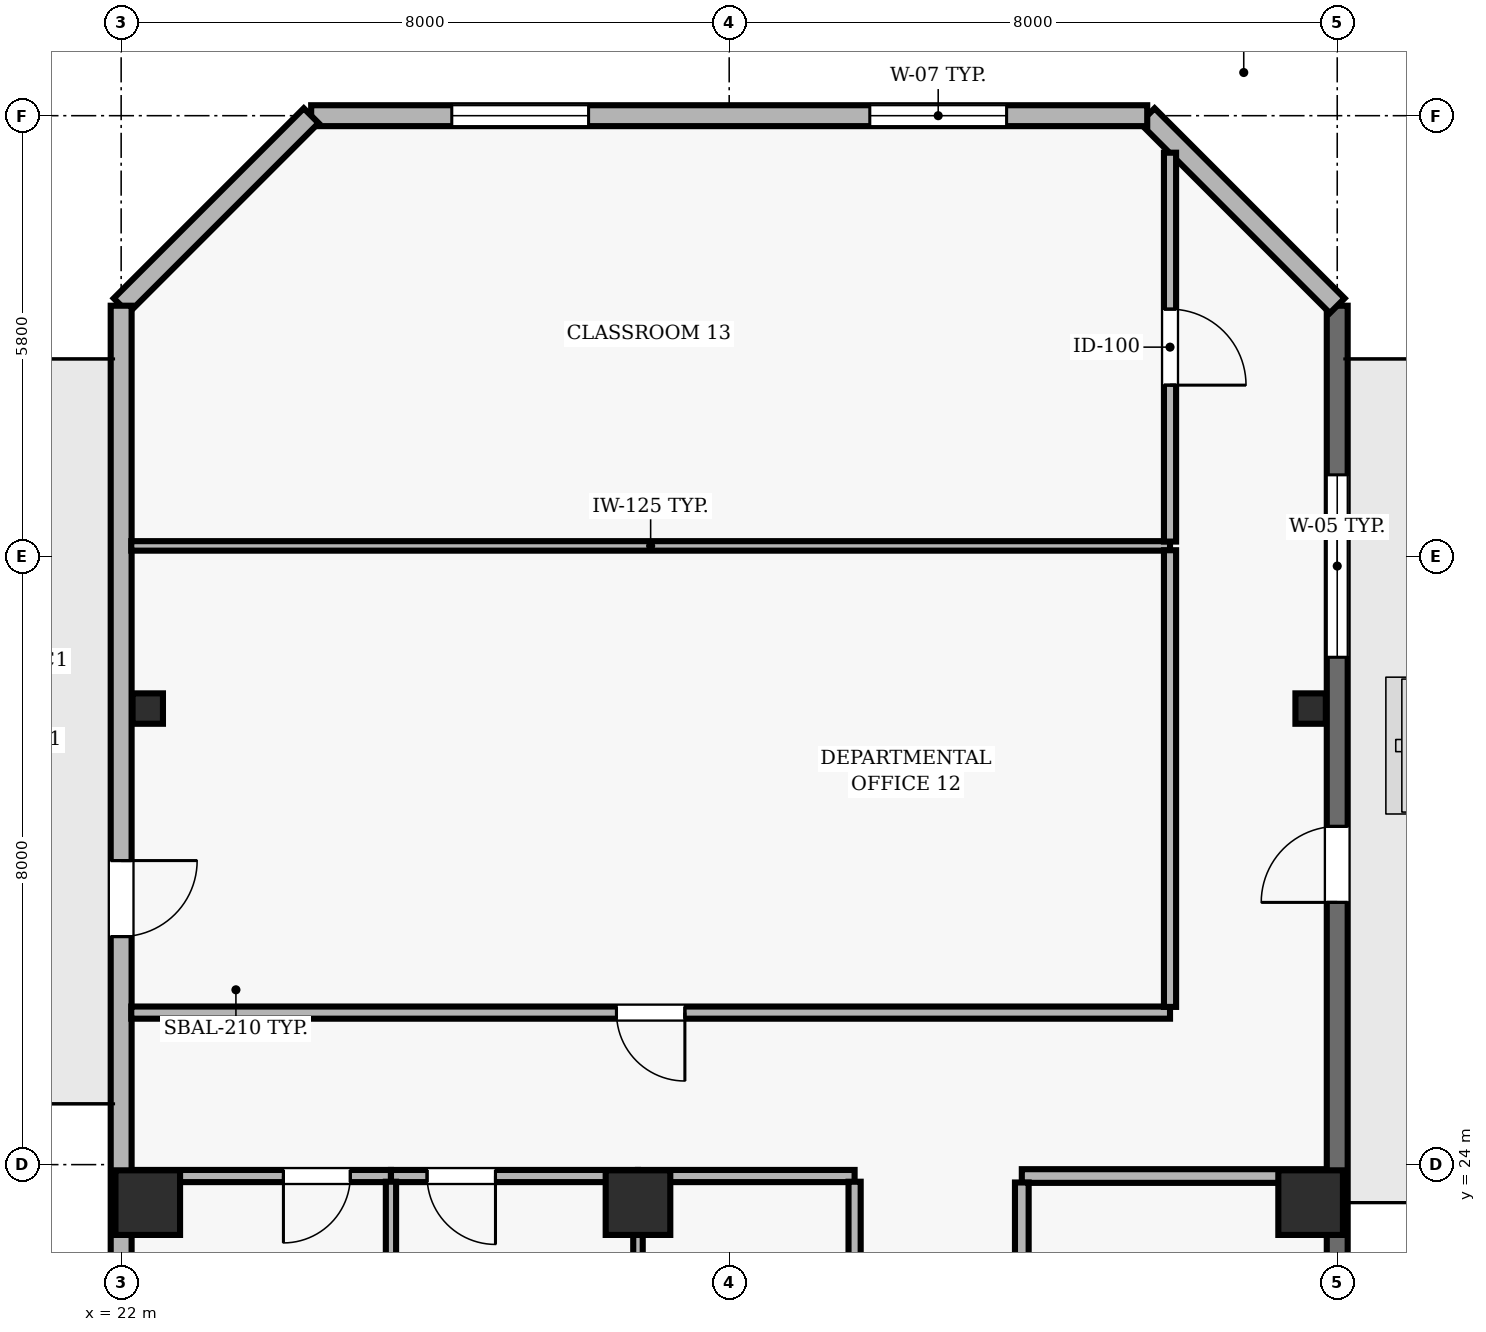
"""IFC4 building model, lengths in metres.
Left out: names, types, materials, properties, quantities, classifications, styles, units other than length and angle.
Written with IfcOpenShell. Run it as: python <this file> out.ifc"""

import sys

from ifc_helpers import new_model, si_unit, direction, frame, frame_2d, origin, origin_2d, place, context, subcontext, project, spatial, rectangle, hollow_rectangle, extrude, element, fill, save


model = new_model("IFC4")
c1 = context("Model", 3, precision=1e-05, world=origin(), true_north=direction((0.0, 1.0)))
c2 = subcontext(c1, "Body", "Model", "MODEL_VIEW")
j1 = project(units=[si_unit("LENGTHUNIT", "METRE"), si_unit("PLANEANGLEUNIT", "RADIAN")], contexts=[c1])
p1 = place(None, origin())
s1 = spatial("IfcSite", under=j1, at=p1, CompositionType="ELEMENT")
p2 = place(p1, origin())
s2 = spatial("IfcBuilding", under=s1, at=p2, CompositionType="ELEMENT")
p3 = place(p2, frame((0.0, 0.0, 279.4)))
s3 = spatial("IfcBuildingStorey", under=s2, at=p3, CompositionType="ELEMENT", Elevation=279.4)
for number, where, z_axis, x_axis in (
    (1, (22.35, 23.5, 0.0), (0.0, 0.0, 1.0), (1.0, 0.0, 0.0)),
    (2, (28.8, 23.5, 0.0), (0.0, 0.0, 1.0), (1.0, 0.0, 0.0)),
    (3, (37.65, 23.5, 0.0), (0.0, 0.0, 1.0), (1.0, 0.0, 0.0)),
):
    element("IfcColumn", number, at=place(p3, frame(where, z_axis=z_axis, x_axis=x_axis)), inside=s3, PredefinedType="COLUMN", context=c2, shape_type="SweptSolid", body=[
        extrude(rectangle(XDim=0.85, YDim=0.85, at=origin_2d()), origin(), (0.0, 0.0, 1.0), 3.9),
    ])
for number, where, z_axis, x_axis in (
    (4, (22.35, 30.0, 0.0), (0.0, 0.0, 1.0), (1.0, 0.0, 0.0)),
    (5, (37.65, 30.0, 0.0), (0.0, 0.0, 1.0), (1.0, 0.0, 0.0)),
):
    element("IfcColumn", number, at=place(p3, frame(where, z_axis=z_axis, x_axis=x_axis)), inside=s3, PredefinedType="COLUMN", context=c2, shape_type="SweptSolid", body=[
        extrude(hollow_rectangle(XDim=0.4, YDim=0.4, WallThickness=0.02, at=origin_2d()), origin(), (0.0, 0.0, 1.0), 3.9),
    ])
p4 = place(p3, frame((38.0, 21.6, 0.0), z_axis=(0.0, 0.0, 1.0), x_axis=(0.0, 1.0, 0.0)))
e6 = element("IfcWall", 6, at=p4, inside=s3, PredefinedType="SOLIDWALL", context=c2, shape_type="SweptSolid", body=[
    extrude(rectangle(XDim=13.7, YDim=0.275, at=frame_2d((6.85, 0.0))), origin(), (0.0, 0.0, 1.0), 3.69),
])
p5 = place(p4, frame((5.85, 0.0, 0.0)))
e7 = element("IfcOpeningElement", 7, at=p5, cuts=e6, PredefinedType="OPENING", context=c2, shape_type="SweptSolid", body=[
    extrude(rectangle(XDim=1.0, YDim=2.2, at=frame_2d((0.5, 1.1))), frame((0.0, 0.147, 0.0), z_axis=(0.0, -1.0, 0.0), x_axis=(1.0, 0.0, 0.0)), (0.0, 0.0, 1.0), 0.295),
])
p6 = place(p4, frame((9.075, 0.0, 0.9)))
e8 = element("IfcOpeningElement", 8, at=p6, cuts=e6, PredefinedType="OPENING", context=c2, shape_type="SweptSolid", body=[
    extrude(rectangle(XDim=2.4, YDim=1.6, at=frame_2d((1.2, 0.8))), frame((0.0, 0.147, 0.0), z_axis=(0.0, -1.0, 0.0), x_axis=(1.0, 0.0, 0.0)), (0.0, 0.0, 1.0), 0.295),
])
p7 = place(p3, frame((38.0, 35.3, 0.0), z_axis=(0.0, 0.0, 1.0), x_axis=(-0.707106781187, 0.707106781187, 0.0)))
e9 = element("IfcWall", 9, at=p7, inside=s3, PredefinedType="SOLIDWALL", context=c2, shape_type="SweptSolid", body=[
    extrude(rectangle(XDim=3.536, YDim=0.275, at=frame_2d((1.768, 0.0))), origin(), (0.0, 0.0, 1.0), 3.69),
])
p8 = place(p3, frame((35.5, 37.8, 0.0), z_axis=(0.0, 0.0, 1.0), x_axis=(-1.0, 0.0, 0.0)))
e10 = element("IfcWall", 10, at=p8, inside=s3, PredefinedType="SOLIDWALL", context=c2, shape_type="SweptSolid", body=[
    extrude(rectangle(XDim=11.0, YDim=0.275, at=frame_2d((5.5, 0.0))), origin(), (0.0, 0.0, 1.0), 3.69),
])
p9 = place(p8, frame((1.85, 0.0, 0.9)))
e11 = element("IfcOpeningElement", 11, at=p9, cuts=e10, PredefinedType="OPENING", context=c2, shape_type="SweptSolid", body=[
    extrude(rectangle(XDim=1.8, YDim=1.8, at=frame_2d((0.9, 0.9))), frame((0.0, 0.147, 0.0), z_axis=(0.0, -1.0, 0.0), x_axis=(1.0, 0.0, 0.0)), (0.0, 0.0, 1.0), 0.295),
])
p10 = place(p8, frame((7.35, 0.0, 0.9)))
e12 = element("IfcOpeningElement", 12, at=p10, cuts=e10, PredefinedType="OPENING", context=c2, shape_type="SweptSolid", body=[
    extrude(rectangle(XDim=1.8, YDim=1.8, at=frame_2d((0.9, 0.9))), frame((0.0, 0.147, 0.0), z_axis=(0.0, -1.0, 0.0), x_axis=(1.0, 0.0, 0.0)), (0.0, 0.0, 1.0), 0.295),
])
p11 = place(p3, frame((24.5, 37.8, 0.0), z_axis=(0.0, 0.0, 1.0), x_axis=(-0.707106781187, -0.707106781187, 0.0)))
e13 = element("IfcWall", 13, at=p11, inside=s3, PredefinedType="SOLIDWALL", context=c2, shape_type="SweptSolid", body=[
    extrude(rectangle(XDim=3.536, YDim=0.275, at=frame_2d((1.768, 0.0))), origin(), (0.0, 0.0, 1.0), 3.69),
])
p12 = place(p3, frame((22.0, 35.3, 0.0), z_axis=(0.0, 0.0, 1.0), x_axis=(0.0, -1.0, 0.0)))
e14 = element("IfcWall", 14, at=p12, inside=s3, PredefinedType="SOLIDWALL", context=c2, shape_type="SweptSolid", body=[
    extrude(rectangle(XDim=32.8, YDim=0.275, at=frame_2d((16.4, 0.0))), origin(), (0.0, 0.0, 1.0), 3.69),
])
p13 = place(p12, frame((7.3, 0.0, 0.0)))
e15 = element("IfcOpeningElement", 15, at=p13, cuts=e14, PredefinedType="OPENING", context=c2, shape_type="SweptSolid", body=[
    extrude(rectangle(XDim=1.0, YDim=2.2, at=frame_2d((0.5, 1.1))), frame((0.0, 0.147, 0.0), z_axis=(0.0, -1.0, 0.0), x_axis=(1.0, 0.0, 0.0)), (0.0, 0.0, 1.0), 0.295),
])
p14 = place(p12, frame((12.717, 0.0, 0.9)))
e16 = element("IfcOpeningElement", 16, at=p14, cuts=e14, PredefinedType="OPENING", context=c2, shape_type="SweptSolid", body=[
    extrude(rectangle(XDim=2.8, YDim=1.8, at=frame_2d((1.4, 0.9))), frame((0.0, 0.147, 0.0), z_axis=(0.0, -1.0, 0.0), x_axis=(1.0, 0.0, 0.0)), (0.0, 0.0, 1.0), 0.295),
])
p15 = place(p12, frame((23.2, 0.0, 0.9)))
e17 = element("IfcOpeningElement", 17, at=p15, cuts=e14, PredefinedType="OPENING", context=c2, shape_type="SweptSolid", body=[
    extrude(rectangle(XDim=2.8, YDim=1.8, at=frame_2d((1.4, 0.9))), frame((0.0, 0.147, 0.0), z_axis=(0.0, -1.0, 0.0), x_axis=(1.0, 0.0, 0.0)), (0.0, 0.0, 1.0), 0.295),
])
p16 = place(p3, frame((25.55, 23.85, 0.0), z_axis=(0.0, 0.0, 1.0), x_axis=(-1.0, 0.0, 0.0)))
e18 = element("IfcWall", 18, at=p16, inside=s3, PredefinedType="PARTITIONING", context=c2, shape_type="SweptSolid", body=[
    extrude(rectangle(XDim=3.35, YDim=0.16, at=frame_2d((1.675, 0.0))), origin(), (0.0, 0.0, 1.0), 3.221),
])
p17 = place(p16, frame((0.535, 0.0, 0.0)))
e19 = element("IfcOpeningElement", 19, at=p17, cuts=e18, PredefinedType="OPENING", context=c2, shape_type="SweptSolid", body=[
    extrude(rectangle(XDim=0.88, YDim=2.1, at=frame_2d((0.44, 1.05))), frame((0.0, 0.09, 0.0), z_axis=(0.0, -1.0, 0.0), x_axis=(1.0, 0.0, 0.0)), (0.0, 0.0, 1.0), 0.18),
])
p18 = place(p3, frame((28.8, 23.85, 0.0), z_axis=(0.0, 0.0, 1.0), x_axis=(-1.0, 0.0, 0.0)))
e20 = element("IfcWall", 20, at=p18, inside=s3, PredefinedType="PARTITIONING", context=c2, shape_type="SweptSolid", body=[
    extrude(rectangle(XDim=3.25, YDim=0.16, at=frame_2d((1.625, 0.0))), origin(), (0.0, 0.0, 1.0), 3.221),
])
p19 = place(p18, frame((1.875, 0.0, 0.0)))
e21 = element("IfcOpeningElement", 21, at=p19, cuts=e20, PredefinedType="OPENING", context=c2, shape_type="SweptSolid", body=[
    extrude(rectangle(XDim=0.9, YDim=2.1, at=frame_2d((0.45, 1.05))), frame((0.0, 0.09, 0.0), z_axis=(0.0, -1.0, 0.0), x_axis=(1.0, 0.0, 0.0)), (0.0, 0.0, 1.0), 0.18),
])
p20 = place(p3, frame((31.65, 23.85, 0.0), z_axis=(0.0, 0.0, 1.0), x_axis=(-1.0, 0.0, 0.0)))
e22 = element("IfcWall", 22, at=p20, inside=s3, PredefinedType="PARTITIONING", context=c2, shape_type="SweptSolid", body=[
    extrude(rectangle(XDim=2.85, YDim=0.16, at=frame_2d((1.425, 0.0))), origin(), (0.0, 0.0, 1.0), 3.221),
])
p21 = place(p3, frame((35.8, 26.0, 0.0), z_axis=(0.0, 0.0, 1.0), x_axis=(-1.0, 0.0, 0.0)))
e23 = element("IfcWall", 23, at=p21, inside=s3, PredefinedType="PARTITIONING", context=c2, shape_type="SweptSolid", body=[
    extrude(rectangle(XDim=13.667, YDim=0.16, at=frame_2d((6.833, 0.0))), origin(), (0.0, 0.0, 1.0), 3.69),
])
p22 = place(p21, frame((6.383, 0.0, 0.0)))
e24 = element("IfcOpeningElement", 24, at=p22, cuts=e23, PredefinedType="OPENING", context=c2, shape_type="SweptSolid", body=[
    extrude(rectangle(XDim=0.9, YDim=2.1, at=frame_2d((0.45, 1.05))), frame((0.0, 0.09, 0.0), z_axis=(0.0, -1.0, 0.0), x_axis=(1.0, 0.0, 0.0)), (0.0, 0.0, 1.0), 0.18),
])
p23 = place(p3, frame((35.8, 32.14, 0.0), z_axis=(0.0, 0.0, 1.0), x_axis=(-1.0, 0.0, 0.0)))
e25 = element("IfcWall", 25, at=p23, inside=s3, PredefinedType="PARTITIONING", context=c2, shape_type="SweptSolid", body=[
    extrude(rectangle(XDim=13.667, YDim=0.125, at=frame_2d((6.833, 0.0))), origin(), (0.0, 0.0, 1.0), 3.69),
])
p24 = place(p3, frame((37.85, 23.85, 0.0), z_axis=(0.0, 0.0, 1.0), x_axis=(-1.0, 0.0, 0.0)))
e26 = element("IfcWall", 26, at=p24, inside=s3, PredefinedType="PARTITIONING", context=c2, shape_type="SweptSolid", body=[
    extrude(rectangle(XDim=4.0, YDim=0.18, at=frame_2d((2.0, 0.0))), origin(), (0.0, 0.0, 1.0), 3.221),
])
p25 = place(p3, frame((25.55, 19.16, 0.0), z_axis=(0.0, 0.0, 1.0), x_axis=(0.0, 1.0, 0.0)))
e27 = element("IfcWall", 27, at=p25, inside=s3, PredefinedType="PARTITIONING", context=c2, shape_type="SweptSolid", body=[
    extrude(rectangle(XDim=4.615, YDim=0.135, at=frame_2d((2.308, 0.0))), origin(), (0.0, 0.0, 1.0), 3.69),
])
p26 = place(p3, frame((28.8, 23.775, 0.0), z_axis=(0.0, 0.0, 1.0), x_axis=(0.0, -1.0, 0.0)))
e28 = element("IfcWall", 28, at=p26, inside=s3, PredefinedType="PARTITIONING", context=c2, shape_type="SweptSolid", body=[
    extrude(rectangle(XDim=4.615, YDim=0.125, at=frame_2d((2.308, 0.0))), origin(), (0.0, 0.0, 1.0), 3.69),
])
p27 = place(p3, frame((31.65, 19.01, 0.0), z_axis=(0.0, 0.0, 1.0), x_axis=(0.0, 1.0, 0.0)))
e29 = element("IfcWall", 29, at=p27, inside=s3, PredefinedType="PARTITIONING", context=c2, shape_type="SweptSolid", body=[
    extrude(rectangle(XDim=4.765, YDim=0.16, at=frame_2d((2.382, 0.0))), origin(), (0.0, 0.0, 1.0), 3.69),
])
p28 = place(p27, frame((1.932, 0.0, 0.0)))
e30 = element("IfcOpeningElement", 30, at=p28, cuts=e29, PredefinedType="OPENING", context=c2, shape_type="SweptSolid", body=[
    extrude(rectangle(XDim=0.9, YDim=2.1, at=frame_2d((0.45, 1.05))), frame((0.0, 0.09, 0.0), z_axis=(0.0, -1.0, 0.0), x_axis=(1.0, 0.0, 0.0)), (0.0, 0.0, 1.0), 0.18),
])
p29 = place(p3, frame((33.85, 17.735, 0.0), z_axis=(0.0, 0.0, 1.0), x_axis=(0.0, 1.0, 0.0)))
e31 = element("IfcWall", 31, at=p29, inside=s3, PredefinedType="PARTITIONING", context=c2, shape_type="SweptSolid", body=[
    extrude(rectangle(XDim=6.03, YDim=0.18, at=frame_2d((3.015, 0.0))), origin(), (0.0, 0.0, 1.0), 3.69),
])
p30 = place(p29, frame((2.54, 0.0, 0.0)))
e32 = element("IfcOpeningElement", 32, at=p30, cuts=e31, PredefinedType="OPENING", context=c2, shape_type="SweptSolid", body=[
    extrude(rectangle(XDim=0.95, YDim=2.1, at=frame_2d((0.475, 1.05))), frame((0.0, 0.1, 0.0), z_axis=(0.0, -1.0, 0.0), x_axis=(1.0, 0.0, 0.0)), (0.0, 0.0, 1.0), 0.2),
])
p31 = place(p3, frame((35.8, 32.083, 0.0), z_axis=(0.0, 0.0, 1.0), x_axis=(0.0, -1.0, 0.0)))
e33 = element("IfcWall", 33, at=p31, inside=s3, PredefinedType="PARTITIONING", context=c2, shape_type="SweptSolid", body=[
    extrude(rectangle(XDim=6.008, YDim=0.16, at=frame_2d((3.004, 0.0))), origin(), (0.0, 0.0, 1.0), 3.69),
])
p32 = place(p3, frame((35.8, 37.313, 0.0), z_axis=(0.0, 0.0, 1.0), x_axis=(0.0, -1.0, 0.0)))
e34 = element("IfcWall", 34, at=p32, inside=s3, PredefinedType="PARTITIONING", context=c2, shape_type="SweptSolid", body=[
    extrude(rectangle(XDim=5.116, YDim=0.16, at=frame_2d((2.558, 0.0))), origin(), (0.0, 0.0, 1.0), 3.69),
])
p33 = place(p32, frame((2.058, 0.0, 0.0)))
e35 = element("IfcOpeningElement", 35, at=p33, cuts=e34, PredefinedType="OPENING", context=c2, shape_type="SweptSolid", body=[
    extrude(rectangle(XDim=1.0, YDim=2.1, at=frame_2d((0.5, 1.05))), frame((0.0, 0.09, 0.0), z_axis=(0.0, -1.0, 0.0), x_axis=(1.0, 0.0, 0.0)), (0.0, 0.0, 1.0), 0.18),
])
p34 = place(p5, origin())
e36 = element("IfcDoor", 36, at=p34, inside=s3, OperationType="SINGLE_SWING_LEFT", PredefinedType="DOOR", context=c2, shape_type="SweptSolid", body=[
    extrude(rectangle(XDim=1.0, YDim=2.2, at=frame_2d((0.5, 1.1))), frame((0.0, 0.025, 0.0), z_axis=(0.0, -1.0, 0.0), x_axis=(1.0, 0.0, 0.0)), (0.0, 0.0, 1.0), 0.05),
])
fill(e7, e36)
p35 = place(p6, origin())
e37 = element("IfcWindow", 37, at=p35, inside=s3, PartitioningType="SINGLE_PANEL", PredefinedType="WINDOW", context=c2, shape_type="SweptSolid", body=[
    extrude(rectangle(XDim=2.4, YDim=1.6, at=frame_2d((1.2, 0.8))), frame((0.0, 0.03, 0.0), z_axis=(0.0, -1.0, 0.0), x_axis=(1.0, 0.0, 0.0)), (0.0, 0.0, 1.0), 0.06),
])
fill(e8, e37)
p36 = place(p9, origin())
e38 = element("IfcWindow", 38, at=p36, inside=s3, PartitioningType="SINGLE_PANEL", PredefinedType="WINDOW", context=c2, shape_type="SweptSolid", body=[
    extrude(rectangle(XDim=1.8, YDim=1.8, at=frame_2d((0.9, 0.9))), frame((0.0, 0.03, 0.0), z_axis=(0.0, -1.0, 0.0), x_axis=(1.0, 0.0, 0.0)), (0.0, 0.0, 1.0), 0.06),
])
fill(e11, e38)
p37 = place(p10, origin())
e39 = element("IfcWindow", 39, at=p37, inside=s3, PartitioningType="SINGLE_PANEL", PredefinedType="WINDOW", context=c2, shape_type="SweptSolid", body=[
    extrude(rectangle(XDim=1.8, YDim=1.8, at=frame_2d((0.9, 0.9))), frame((0.0, 0.03, 0.0), z_axis=(0.0, -1.0, 0.0), x_axis=(1.0, 0.0, 0.0)), (0.0, 0.0, 1.0), 0.06),
])
fill(e12, e39)
p38 = place(p13, origin())
e40 = element("IfcDoor", 40, at=p38, inside=s3, OperationType="SINGLE_SWING_LEFT", PredefinedType="DOOR", context=c2, shape_type="SweptSolid", body=[
    extrude(rectangle(XDim=1.0, YDim=2.2, at=frame_2d((0.5, 1.1))), frame((0.0, 0.025, 0.0), z_axis=(0.0, -1.0, 0.0), x_axis=(1.0, 0.0, 0.0)), (0.0, 0.0, 1.0), 0.05),
])
fill(e15, e40)
p39 = place(p17, origin())
e41 = element("IfcDoor", 41, at=p39, inside=s3, OperationType="SINGLE_SWING_RIGHT", PredefinedType="DOOR", context=c2, shape_type="SweptSolid", body=[
    extrude(rectangle(XDim=0.88, YDim=2.1, at=frame_2d((0.44, 1.05))), frame((0.0, 0.025, 0.0), z_axis=(0.0, -1.0, 0.0), x_axis=(1.0, 0.0, 0.0)), (0.0, 0.0, 1.0), 0.05),
])
fill(e19, e41)
p40 = place(p19, origin())
e42 = element("IfcDoor", 42, at=p40, inside=s3, OperationType="SINGLE_SWING_LEFT", PredefinedType="DOOR", context=c2, shape_type="SweptSolid", body=[
    extrude(rectangle(XDim=0.9, YDim=2.1, at=frame_2d((0.45, 1.05))), frame((0.0, 0.025, 0.0), z_axis=(0.0, -1.0, 0.0), x_axis=(1.0, 0.0, 0.0)), (0.0, 0.0, 1.0), 0.05),
])
fill(e21, e42)
p41 = place(p22, origin())
e43 = element("IfcDoor", 43, at=p41, inside=s3, OperationType="SINGLE_SWING_LEFT", PredefinedType="DOOR", context=c2, shape_type="SweptSolid", body=[
    extrude(rectangle(XDim=0.9, YDim=2.1, at=frame_2d((0.45, 1.05))), frame((0.0, 0.025, 0.0), z_axis=(0.0, -1.0, 0.0), x_axis=(1.0, 0.0, 0.0)), (0.0, 0.0, 1.0), 0.05),
])
fill(e24, e43)
p42 = place(p33, origin())
e44 = element("IfcDoor", 44, at=p42, inside=s3, OperationType="SINGLE_SWING_RIGHT", PredefinedType="DOOR", context=c2, shape_type="SweptSolid", body=[
    extrude(rectangle(XDim=1.0, YDim=2.1, at=frame_2d((0.5, 1.05))), frame((0.0, 0.025, 0.0), z_axis=(0.0, -1.0, 0.0), x_axis=(1.0, 0.0, 0.0)), (0.0, 0.0, 1.0), 0.05),
])
fill(e35, e44)
save(model, sys.argv[1])
